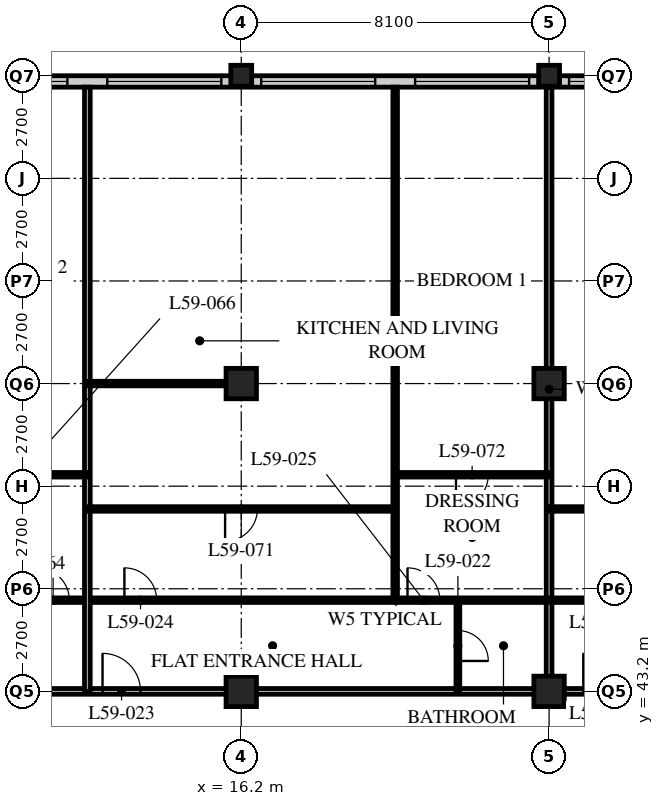
"""IFC4 building model, lengths in metres.
Left out: names, types, materials, properties, quantities, classifications, styles, units other than length and angle.
Written with IfcOpenShell. Run it as: python <this file> out.ifc"""

import sys

from ifc_helpers import new_model, si_unit, direction, frame, frame_2d, origin, origin_2d, place, context, subcontext, project, spatial, rectangle, hollow_rectangle, extrude, element, fill, save


model = new_model("IFC4")
c1 = context("Model", 3, precision=1e-05, world=origin(), true_north=direction((0.0, 1.0)))
c2 = subcontext(c1, "Body", "Model", "MODEL_VIEW")
j1 = project(units=[si_unit("LENGTHUNIT", "METRE"), si_unit("PLANEANGLEUNIT", "RADIAN")], contexts=[c1])
p1 = place(None, origin())
s1 = spatial("IfcSite", under=j1, at=p1, CompositionType="ELEMENT")
p2 = place(p1, origin())
s2 = spatial("IfcBuilding", under=s1, at=p2, CompositionType="ELEMENT")
p3 = place(p2, frame((0.0, 0.0, 228.0)))
s3 = spatial("IfcBuildingStorey", under=s2, at=p3, CompositionType="ELEMENT", Elevation=228.0)
for number, where, z_axis, x_axis in (
    (1, (16.2, 43.2, 0.0), (0.0, 0.0, 1.0), (1.0, 0.0, 0.0)),
    (2, (16.2, 51.3, 0.0), (0.0, 0.0, 1.0), (1.0, 0.0, 0.0)),
):
    element("IfcColumn", number, at=place(p3, frame(where, z_axis=z_axis, x_axis=x_axis)), inside=s3, PredefinedType="COLUMN", context=c2, shape_type="SweptSolid", body=[
        extrude(hollow_rectangle(XDim=0.8, YDim=0.8, WallThickness=0.08, at=origin_2d()), origin(), (0.0, 0.0, 1.0), 3.6),
    ])
p4 = place(p3, frame((16.2, 59.4, 0.0), z_axis=(0.0, 0.0, 1.0), x_axis=(1.0, 0.0, 0.0)))
e3 = element("IfcColumn", 3, at=p4, inside=s3, PredefinedType="COLUMN", context=c2, shape_type="SweptSolid", body=[
    extrude(hollow_rectangle(XDim=0.55, YDim=0.55, WallThickness=0.045, at=origin_2d()), origin(), (0.0, 0.0, 1.0), 3.6),
])
for number, where, z_axis, x_axis in (
    (4, (24.3, 43.2, 0.0), (0.0, 0.0, 1.0), (1.0, 0.0, 0.0)),
    (5, (24.3, 51.3, 0.0), (0.0, 0.0, 1.0), (1.0, 0.0, 0.0)),
):
    element("IfcColumn", number, at=place(p3, frame(where, z_axis=z_axis, x_axis=x_axis)), inside=s3, PredefinedType="COLUMN", context=c2, shape_type="SweptSolid", body=[
        extrude(hollow_rectangle(XDim=0.8, YDim=0.8, WallThickness=0.08, at=origin_2d()), origin(), (0.0, 0.0, 1.0), 3.6),
    ])
p5 = place(p3, frame((24.3, 59.4, 0.0), z_axis=(0.0, 0.0, 1.0), x_axis=(1.0, 0.0, 0.0)))
e6 = element("IfcColumn", 6, at=p5, inside=s3, PredefinedType="COLUMN", context=c2, shape_type="SweptSolid", body=[
    extrude(hollow_rectangle(XDim=0.55, YDim=0.55, WallThickness=0.045, at=origin_2d()), origin(), (0.0, 0.0, 1.0), 3.6),
])
p6 = place(p3, frame((48.3, 59.25, 0.0), z_axis=(0.0, 0.0, 1.0), x_axis=(-1.0, 0.0, 0.0)))
e7 = element("IfcWall", 7, at=p6, inside=s3, PredefinedType="SOLIDWALL", context=c2, shape_type="SweptSolid", body=[
    extrude(rectangle(XDim=40.2, YDim=0.3, at=frame_2d((20.1, 0.0))), origin(), (0.0, 0.0, 1.0), 3.39),
])
p7 = place(p6, frame((0.225, 0.0, 0.6)))
e8 = element("IfcOpeningElement", 8, at=p7, cuts=e7, PredefinedType="OPENING", context=c2, shape_type="SweptSolid", body=[
    extrude(rectangle(XDim=3.0, YDim=2.0, at=frame_2d((1.5, 1.0))), frame((0.0, 0.16, 0.0), z_axis=(0.0, -1.0, 0.0), x_axis=(1.0, 0.0, 0.0)), (0.0, 0.0, 1.0), 0.32),
])
p8 = place(p6, frame((4.275, 0.0, 0.6)))
e9 = element("IfcOpeningElement", 9, at=p8, cuts=e7, PredefinedType="OPENING", context=c2, shape_type="SweptSolid", body=[
    extrude(rectangle(XDim=3.0, YDim=2.0, at=frame_2d((1.5, 1.0))), frame((0.0, 0.16, 0.0), z_axis=(0.0, -1.0, 0.0), x_axis=(1.0, 0.0, 0.0)), (0.0, 0.0, 1.0), 0.32),
])
p9 = place(p6, frame((8.325, 0.0, 0.6)))
e10 = element("IfcOpeningElement", 10, at=p9, cuts=e7, PredefinedType="OPENING", context=c2, shape_type="SweptSolid", body=[
    extrude(rectangle(XDim=3.0, YDim=2.0, at=frame_2d((1.5, 1.0))), frame((0.0, 0.16, 0.0), z_axis=(0.0, -1.0, 0.0), x_axis=(1.0, 0.0, 0.0)), (0.0, 0.0, 1.0), 0.32),
])
p10 = place(p6, frame((12.375, 0.0, 0.6)))
e11 = element("IfcOpeningElement", 11, at=p10, cuts=e7, PredefinedType="OPENING", context=c2, shape_type="SweptSolid", body=[
    extrude(rectangle(XDim=3.0, YDim=2.0, at=frame_2d((1.5, 1.0))), frame((0.0, 0.16, 0.0), z_axis=(0.0, -1.0, 0.0), x_axis=(1.0, 0.0, 0.0)), (0.0, 0.0, 1.0), 0.32),
])
p11 = place(p6, frame((16.425, 0.0, 0.6)))
e12 = element("IfcOpeningElement", 12, at=p11, cuts=e7, PredefinedType="OPENING", context=c2, shape_type="SweptSolid", body=[
    extrude(rectangle(XDim=3.0, YDim=2.0, at=frame_2d((1.5, 1.0))), frame((0.0, 0.16, 0.0), z_axis=(0.0, -1.0, 0.0), x_axis=(1.0, 0.0, 0.0)), (0.0, 0.0, 1.0), 0.32),
])
p12 = place(p6, frame((20.475, 0.0, 0.6)))
e13 = element("IfcOpeningElement", 13, at=p12, cuts=e7, PredefinedType="OPENING", context=c2, shape_type="SweptSolid", body=[
    extrude(rectangle(XDim=3.0, YDim=2.0, at=frame_2d((1.5, 1.0))), frame((0.0, 0.16, 0.0), z_axis=(0.0, -1.0, 0.0), x_axis=(1.0, 0.0, 0.0)), (0.0, 0.0, 1.0), 0.32),
])
p13 = place(p6, frame((24.525, 0.0, 0.6)))
e14 = element("IfcOpeningElement", 14, at=p13, cuts=e7, PredefinedType="OPENING", context=c2, shape_type="SweptSolid", body=[
    extrude(rectangle(XDim=3.0, YDim=2.0, at=frame_2d((1.5, 1.0))), frame((0.0, 0.16, 0.0), z_axis=(0.0, -1.0, 0.0), x_axis=(1.0, 0.0, 0.0)), (0.0, 0.0, 1.0), 0.32),
])
p14 = place(p6, frame((28.575, 0.0, 0.6)))
e15 = element("IfcOpeningElement", 15, at=p14, cuts=e7, PredefinedType="OPENING", context=c2, shape_type="SweptSolid", body=[
    extrude(rectangle(XDim=3.0, YDim=2.0, at=frame_2d((1.5, 1.0))), frame((0.0, 0.16, 0.0), z_axis=(0.0, -1.0, 0.0), x_axis=(1.0, 0.0, 0.0)), (0.0, 0.0, 1.0), 0.32),
])
p15 = place(p6, frame((32.625, 0.0, 0.6)))
e16 = element("IfcOpeningElement", 16, at=p15, cuts=e7, PredefinedType="OPENING", context=c2, shape_type="SweptSolid", body=[
    extrude(rectangle(XDim=3.0, YDim=2.0, at=frame_2d((1.5, 1.0))), frame((0.0, 0.16, 0.0), z_axis=(0.0, -1.0, 0.0), x_axis=(1.0, 0.0, 0.0)), (0.0, 0.0, 1.0), 0.32),
])
p16 = place(p6, frame((36.675, 0.0, 0.6)))
e17 = element("IfcOpeningElement", 17, at=p16, cuts=e7, PredefinedType="OPENING", context=c2, shape_type="SweptSolid", body=[
    extrude(rectangle(XDim=3.0, YDim=2.0, at=frame_2d((1.5, 1.0))), frame((0.0, 0.16, 0.0), z_axis=(0.0, -1.0, 0.0), x_axis=(1.0, 0.0, 0.0)), (0.0, 0.0, 1.0), 0.32),
])
p17 = place(p3, frame((8.1, 43.2, 0.0), z_axis=(0.0, 0.0, 1.0), x_axis=(1.0, 0.0, 0.0)))
e18 = element("IfcWall", 18, at=p17, inside=s3, PredefinedType="PARTITIONING", context=c2, shape_type="SweptSolid", body=[
    extrude(rectangle(XDim=36.45, YDim=0.15, at=frame_2d((18.225, 0.0))), origin(), (0.0, 0.0, 1.0), 2.628),
])
p18 = place(p17, frame((4.45, 0.0, 0.0)))
e19 = element("IfcOpeningElement", 19, at=p18, cuts=e18, PredefinedType="OPENING", context=c2, shape_type="SweptSolid", body=[
    extrude(rectangle(XDim=1.0, YDim=2.1, at=frame_2d((0.5, 1.05))), frame((0.0, 0.085, 0.0), z_axis=(0.0, -1.0, 0.0), x_axis=(1.0, 0.0, 0.0)), (0.0, 0.0, 1.0), 0.17),
])
p19 = place(p17, frame((17.1, 0.0, 0.0)))
e20 = element("IfcOpeningElement", 20, at=p19, cuts=e18, PredefinedType="OPENING", context=c2, shape_type="SweptSolid", body=[
    extrude(rectangle(XDim=1.0, YDim=2.1, at=frame_2d((0.5, 1.05))), frame((0.0, 0.085, 0.0), z_axis=(0.0, -1.0, 0.0), x_axis=(1.0, 0.0, 0.0)), (0.0, 0.0, 1.0), 0.17),
])
p20 = place(p17, frame((29.05, 0.0, 0.0)))
e21 = element("IfcOpeningElement", 21, at=p20, cuts=e18, PredefinedType="OPENING", context=c2, shape_type="SweptSolid", body=[
    extrude(rectangle(XDim=1.0, YDim=2.1, at=frame_2d((0.5, 1.05))), frame((0.0, 0.085, 0.0), z_axis=(0.0, -1.0, 0.0), x_axis=(1.0, 0.0, 0.0)), (0.0, 0.0, 1.0), 0.17),
])
p21 = place(p17, frame((33.925, 0.0, 0.0)))
e22 = element("IfcOpeningElement", 22, at=p21, cuts=e18, PredefinedType="OPENING", context=c2, shape_type="SweptSolid", body=[
    extrude(rectangle(XDim=1.0, YDim=2.1, at=frame_2d((0.5, 1.05))), frame((0.0, 0.085, 0.0), z_axis=(0.0, -1.0, 0.0), x_axis=(1.0, 0.0, 0.0)), (0.0, 0.0, 1.0), 0.17),
])
p22 = place(p17, frame((1.525, 0.0, 0.0)))
e23 = element("IfcOpeningElement", 23, at=p22, cuts=e18, PredefinedType="OPENING", context=c2, shape_type="SweptSolid", body=[
    extrude(rectangle(XDim=1.0, YDim=2.1, at=frame_2d((0.5, 1.05))), frame((0.0, 0.085, 0.0), z_axis=(0.0, -1.0, 0.0), x_axis=(1.0, 0.0, 0.0)), (0.0, 0.0, 1.0), 0.17),
])
p23 = place(p3, frame((21.9, 43.2, 0.0), z_axis=(0.0, 0.0, 1.0), x_axis=(0.0, 1.0, 0.0)))
e24 = element("IfcWall", 24, at=p23, inside=s3, PredefinedType="PARTITIONING", context=c2, shape_type="SweptSolid", body=[
    extrude(rectangle(XDim=2.4, YDim=0.1, at=frame_2d((1.2, 0.0))), origin(), (0.0, 0.0, 1.0), 3.39),
])
p24 = place(p23, frame((0.8, 0.0, 0.0)))
e25 = element("IfcOpeningElement", 25, at=p24, cuts=e24, PredefinedType="OPENING", context=c2, shape_type="SweptSolid", body=[
    extrude(rectangle(XDim=0.8, YDim=2.1, at=frame_2d((0.4, 1.05))), frame((0.0, 0.06, 0.0), z_axis=(0.0, -1.0, 0.0), x_axis=(1.0, 0.0, 0.0)), (0.0, 0.0, 1.0), 0.12),
])
p25 = place(p3, frame((20.25, 45.6, 0.0), z_axis=(0.0, 0.0, 1.0), x_axis=(0.0, 1.0, 0.0)))
e26 = element("IfcWall", 26, at=p25, inside=s3, PredefinedType="PARTITIONING", context=c2, shape_type="SweptSolid", body=[
    extrude(rectangle(XDim=13.5, YDim=0.12, at=frame_2d((6.75, 0.0))), origin(), (0.0, 0.0, 1.0), 3.39),
])
p26 = place(p3, frame((24.3, 43.2, 0.0), z_axis=(0.0, 0.0, 1.0), x_axis=(0.0, 1.0, 0.0)))
e27 = element("IfcWall", 27, at=p26, inside=s3, PredefinedType="PARTITIONING", context=c2, shape_type="SweptSolid", body=[
    extrude(rectangle(XDim=15.9, YDim=0.15, at=frame_2d((7.95, 0.0))), origin(), (0.0, 0.0, 1.0), 2.628),
])
p27 = place(p3, frame((4.1, 45.6, 0.0), z_axis=(0.0, 0.0, 1.0), x_axis=(1.0, 0.0, 0.0)))
e28 = element("IfcWall", 28, at=p27, inside=s3, PredefinedType="PARTITIONING", context=c2, shape_type="SweptSolid", body=[
    extrude(rectangle(XDim=32.35, YDim=0.12, at=frame_2d((16.175, 0.0))), origin(), (0.0, 0.0, 1.0), 3.39),
])
p28 = place(p27, frame((9.025, 0.0, 0.0)))
e29 = element("IfcOpeningElement", 29, at=p28, cuts=e28, PredefinedType="OPENING", context=c2, shape_type="SweptSolid", body=[
    extrude(rectangle(XDim=0.85, YDim=2.1, at=frame_2d((0.425, 1.05))), frame((0.0, 0.07, 0.0), z_axis=(0.0, -1.0, 0.0), x_axis=(1.0, 0.0, 0.0)), (0.0, 0.0, 1.0), 0.14),
])
p29 = place(p27, frame((16.475, 0.0, 0.0)))
e30 = element("IfcOpeningElement", 30, at=p29, cuts=e28, PredefinedType="OPENING", context=c2, shape_type="SweptSolid", body=[
    extrude(rectangle(XDim=0.85, YDim=2.1, at=frame_2d((0.425, 1.05))), frame((0.0, 0.07, 0.0), z_axis=(0.0, -1.0, 0.0), x_axis=(1.0, 0.0, 0.0)), (0.0, 0.0, 1.0), 0.14),
])
p30 = place(p27, frame((21.175, 0.0, 0.0)))
e31 = element("IfcOpeningElement", 31, at=p30, cuts=e28, PredefinedType="OPENING", context=c2, shape_type="SweptSolid", body=[
    extrude(rectangle(XDim=0.85, YDim=2.1, at=frame_2d((0.425, 1.05))), frame((0.0, 0.07, 0.0), z_axis=(0.0, -1.0, 0.0), x_axis=(1.0, 0.0, 0.0)), (0.0, 0.0, 1.0), 0.14),
])
p31 = place(p27, frame((28.625, 0.0, 0.0)))
e32 = element("IfcOpeningElement", 32, at=p31, cuts=e28, PredefinedType="OPENING", context=c2, shape_type="SweptSolid", body=[
    extrude(rectangle(XDim=0.85, YDim=2.1, at=frame_2d((0.425, 1.05))), frame((0.0, 0.07, 0.0), z_axis=(0.0, -1.0, 0.0), x_axis=(1.0, 0.0, 0.0)), (0.0, 0.0, 1.0), 0.14),
])
p32 = place(p27, frame((6.725, 0.0, 0.0)))
e33 = element("IfcOpeningElement", 33, at=p32, cuts=e28, PredefinedType="OPENING", context=c2, shape_type="SweptSolid", body=[
    extrude(rectangle(XDim=0.85, YDim=2.1, at=frame_2d((0.425, 1.05))), frame((0.0, 0.07, 0.0), z_axis=(0.0, -1.0, 0.0), x_axis=(1.0, 0.0, 0.0)), (0.0, 0.0, 1.0), 0.14),
])
p33 = place(p27, frame((2.875, 0.0, 0.0)))
e34 = element("IfcOpeningElement", 34, at=p33, cuts=e28, PredefinedType="OPENING", context=c2, shape_type="SweptSolid", body=[
    extrude(rectangle(XDim=0.85, YDim=2.1, at=frame_2d((0.425, 1.05))), frame((0.0, 0.07, 0.0), z_axis=(0.0, -1.0, 0.0), x_axis=(1.0, 0.0, 0.0)), (0.0, 0.0, 1.0), 0.14),
])
p34 = place(p3, frame((12.15, 43.2, 0.0), z_axis=(0.0, 0.0, 1.0), x_axis=(0.0, 1.0, 0.0)))
e35 = element("IfcWall", 35, at=p34, inside=s3, PredefinedType="PARTITIONING", context=c2, shape_type="SweptSolid", body=[
    extrude(rectangle(XDim=15.9, YDim=0.15, at=frame_2d((7.95, 0.0))), origin(), (0.0, 0.0, 1.0), 3.39),
])
p35 = place(p3, frame((12.15, 48.0, 0.0), z_axis=(0.0, 0.0, 1.0), x_axis=(1.0, 0.0, 0.0)))
e36 = element("IfcWall", 36, at=p35, inside=s3, PredefinedType="PARTITIONING", context=c2, shape_type="SweptSolid", body=[
    extrude(rectangle(XDim=8.1, YDim=0.12, at=frame_2d((4.05, 0.0))), origin(), (0.0, 0.0, 1.0), 3.39),
])
p36 = place(p35, frame((3.625, 0.0, 0.0)))
e37 = element("IfcOpeningElement", 37, at=p36, cuts=e36, PredefinedType="OPENING", context=c2, shape_type="SweptSolid", body=[
    extrude(rectangle(XDim=0.85, YDim=2.1, at=frame_2d((0.425, 1.05))), frame((0.0, 0.07, 0.0), z_axis=(0.0, -1.0, 0.0), x_axis=(1.0, 0.0, 0.0)), (0.0, 0.0, 1.0), 0.14),
])
p37 = place(p3, frame((20.25, 48.9, 0.0), z_axis=(0.0, 0.0, 1.0), x_axis=(1.0, 0.0, 0.0)))
e38 = element("IfcWall", 38, at=p37, inside=s3, PredefinedType="PARTITIONING", context=c2, shape_type="SweptSolid", body=[
    extrude(rectangle(XDim=4.05, YDim=0.12, at=frame_2d((2.025, 0.0))), origin(), (0.0, 0.0, 1.0), 3.39),
])
p38 = place(p37, frame((1.6, 0.0, 0.0)))
e39 = element("IfcOpeningElement", 39, at=p38, cuts=e38, PredefinedType="OPENING", context=c2, shape_type="SweptSolid", body=[
    extrude(rectangle(XDim=0.85, YDim=2.1, at=frame_2d((0.425, 1.05))), frame((0.0, 0.07, 0.0), z_axis=(0.0, -1.0, 0.0), x_axis=(1.0, 0.0, 0.0)), (0.0, 0.0, 1.0), 0.14),
])
p39 = place(p3, frame((24.3, 48.0, 0.0), z_axis=(0.0, 0.0, 1.0), x_axis=(1.0, 0.0, 0.0)))
e40 = element("IfcWall", 40, at=p39, inside=s3, PredefinedType="PARTITIONING", context=c2, shape_type="SweptSolid", body=[
    extrude(rectangle(XDim=8.1, YDim=0.12, at=frame_2d((4.05, 0.0))), origin(), (0.0, 0.0, 1.0), 3.39),
])
p40 = place(p39, frame((3.625, 0.0, 0.0)))
e41 = element("IfcOpeningElement", 41, at=p40, cuts=e40, PredefinedType="OPENING", context=c2, shape_type="SweptSolid", body=[
    extrude(rectangle(XDim=0.85, YDim=2.1, at=frame_2d((0.425, 1.05))), frame((0.0, 0.07, 0.0), z_axis=(0.0, -1.0, 0.0), x_axis=(1.0, 0.0, 0.0)), (0.0, 0.0, 1.0), 0.14),
])
p41 = place(p3, frame((8.1, 48.9, 0.0), z_axis=(0.0, 0.0, 1.0), x_axis=(1.0, 0.0, 0.0)))
e42 = element("IfcWall", 42, at=p41, inside=s3, PredefinedType="PARTITIONING", context=c2, shape_type="SweptSolid", body=[
    extrude(rectangle(XDim=4.05, YDim=0.12, at=frame_2d((2.025, 0.0))), origin(), (0.0, 0.0, 1.0), 3.39),
])
p42 = place(p41, frame((1.6, 0.0, 0.0)))
e43 = element("IfcOpeningElement", 43, at=p42, cuts=e42, PredefinedType="OPENING", context=c2, shape_type="SweptSolid", body=[
    extrude(rectangle(XDim=0.85, YDim=2.1, at=frame_2d((0.425, 1.05))), frame((0.0, 0.07, 0.0), z_axis=(0.0, -1.0, 0.0), x_axis=(1.0, 0.0, 0.0)), (0.0, 0.0, 1.0), 0.14),
])
p43 = place(p3, frame((12.15, 51.3, 0.0), z_axis=(0.0, 0.0, 1.0), x_axis=(1.0, 0.0, 0.0)))
e44 = element("IfcWall", 44, at=p43, inside=s3, PredefinedType="PARTITIONING", context=c2, shape_type="SweptSolid", body=[
    extrude(rectangle(XDim=3.65, YDim=0.12, at=frame_2d((1.825, 0.0))), origin(), (0.0, 0.0, 1.0), 2.628),
])
p44 = place(p12, origin())
e45 = element("IfcWindow", 45, at=p44, inside=s3, PartitioningType="SINGLE_PANEL", PredefinedType="WINDOW", context=c2, shape_type="SweptSolid", body=[
    extrude(rectangle(XDim=3.0, YDim=2.0, at=frame_2d((1.5, 1.0))), frame((0.0, 0.03, 0.0), z_axis=(0.0, -1.0, 0.0), x_axis=(1.0, 0.0, 0.0)), (0.0, 0.0, 1.0), 0.06),
])
fill(e13, e45)
p45 = place(p13, origin())
e46 = element("IfcWindow", 46, at=p45, inside=s3, PartitioningType="SINGLE_PANEL", PredefinedType="WINDOW", context=c2, shape_type="SweptSolid", body=[
    extrude(rectangle(XDim=3.0, YDim=2.0, at=frame_2d((1.5, 1.0))), frame((0.0, 0.03, 0.0), z_axis=(0.0, -1.0, 0.0), x_axis=(1.0, 0.0, 0.0)), (0.0, 0.0, 1.0), 0.06),
])
fill(e14, e46)
p46 = place(p14, origin())
e47 = element("IfcWindow", 47, at=p46, inside=s3, PartitioningType="SINGLE_PANEL", PredefinedType="WINDOW", context=c2, shape_type="SweptSolid", body=[
    extrude(rectangle(XDim=3.0, YDim=2.0, at=frame_2d((1.5, 1.0))), frame((0.0, 0.03, 0.0), z_axis=(0.0, -1.0, 0.0), x_axis=(1.0, 0.0, 0.0)), (0.0, 0.0, 1.0), 0.06),
])
fill(e15, e47)
p47 = place(p15, origin())
e48 = element("IfcWindow", 48, at=p47, inside=s3, PartitioningType="SINGLE_PANEL", PredefinedType="WINDOW", context=c2, shape_type="SweptSolid", body=[
    extrude(rectangle(XDim=3.0, YDim=2.0, at=frame_2d((1.5, 1.0))), frame((0.0, 0.03, 0.0), z_axis=(0.0, -1.0, 0.0), x_axis=(1.0, 0.0, 0.0)), (0.0, 0.0, 1.0), 0.06),
])
fill(e16, e48)
p48 = place(p16, origin())
e49 = element("IfcWindow", 49, at=p48, inside=s3, PartitioningType="SINGLE_PANEL", PredefinedType="WINDOW", context=c2, shape_type="SweptSolid", body=[
    extrude(rectangle(XDim=3.0, YDim=2.0, at=frame_2d((1.5, 1.0))), frame((0.0, 0.03, 0.0), z_axis=(0.0, -1.0, 0.0), x_axis=(1.0, 0.0, 0.0)), (0.0, 0.0, 1.0), 0.06),
])
fill(e17, e49)
p49 = place(p24, origin())
e50 = element("IfcDoor", 50, at=p49, inside=s3, OperationType="SINGLE_SWING_RIGHT", PredefinedType="DOOR", context=c2, shape_type="SweptSolid", body=[
    extrude(rectangle(XDim=0.8, YDim=2.1, at=frame_2d((0.4, 1.05))), frame((0.0, 0.025, 0.0), z_axis=(0.0, -1.0, 0.0), x_axis=(1.0, 0.0, 0.0)), (0.0, 0.0, 1.0), 0.05),
])
fill(e25, e50)
p50 = place(p18, origin())
e51 = element("IfcDoor", 51, at=p50, inside=s3, OperationType="SINGLE_SWING_LEFT", PredefinedType="DOOR", context=c2, shape_type="SweptSolid", body=[
    extrude(rectangle(XDim=1.0, YDim=2.1, at=frame_2d((0.5, 1.05))), frame((0.0, 0.025, 0.0), z_axis=(0.0, -1.0, 0.0), x_axis=(1.0, 0.0, 0.0)), (0.0, 0.0, 1.0), 0.05),
])
fill(e19, e51)
p51 = place(p28, origin())
e52 = element("IfcDoor", 52, at=p51, inside=s3, OperationType="SINGLE_SWING_LEFT", PredefinedType="DOOR", context=c2, shape_type="SweptSolid", body=[
    extrude(rectangle(XDim=0.85, YDim=2.1, at=frame_2d((0.425, 1.05))), frame((0.0, 0.025, 0.0), z_axis=(0.0, -1.0, 0.0), x_axis=(1.0, 0.0, 0.0)), (0.0, 0.0, 1.0), 0.05),
])
fill(e29, e52)
p52 = place(p29, origin())
e53 = element("IfcDoor", 53, at=p52, inside=s3, OperationType="SINGLE_SWING_LEFT", PredefinedType="DOOR", context=c2, shape_type="SweptSolid", body=[
    extrude(rectangle(XDim=0.85, YDim=2.1, at=frame_2d((0.425, 1.05))), frame((0.0, 0.025, 0.0), z_axis=(0.0, -1.0, 0.0), x_axis=(1.0, 0.0, 0.0)), (0.0, 0.0, 1.0), 0.05),
])
fill(e30, e53)
p53 = place(p19, origin())
e54 = element("IfcDoor", 54, at=p53, inside=s3, OperationType="SINGLE_SWING_LEFT", PredefinedType="DOOR", context=c2, shape_type="SweptSolid", body=[
    extrude(rectangle(XDim=1.0, YDim=2.1, at=frame_2d((0.5, 1.05))), frame((0.0, 0.025, 0.0), z_axis=(0.0, -1.0, 0.0), x_axis=(1.0, 0.0, 0.0)), (0.0, 0.0, 1.0), 0.05),
])
fill(e20, e54)
p54 = place(p32, origin())
e55 = element("IfcDoor", 55, at=p54, inside=s3, OperationType="SINGLE_SWING_LEFT", PredefinedType="DOOR", context=c2, shape_type="SweptSolid", body=[
    extrude(rectangle(XDim=0.85, YDim=2.1, at=frame_2d((0.425, 1.05))), frame((0.0, 0.025, 0.0), z_axis=(0.0, -1.0, 0.0), x_axis=(1.0, 0.0, 0.0)), (0.0, 0.0, 1.0), 0.05),
])
fill(e33, e55)
p55 = place(p36, origin())
e56 = element("IfcDoor", 56, at=p55, inside=s3, OperationType="SINGLE_SWING_RIGHT", PredefinedType="DOOR", context=c2, shape_type="SweptSolid", body=[
    extrude(rectangle(XDim=0.85, YDim=2.1, at=frame_2d((0.425, 1.05))), frame((0.0, 0.025, 0.0), z_axis=(0.0, -1.0, 0.0), x_axis=(1.0, 0.0, 0.0)), (0.0, 0.0, 1.0), 0.05),
])
fill(e37, e56)
p56 = place(p38, origin())
e57 = element("IfcDoor", 57, at=p56, inside=s3, OperationType="SINGLE_SWING_RIGHT", PredefinedType="DOOR", context=c2, shape_type="SweptSolid", body=[
    extrude(rectangle(XDim=0.85, YDim=2.1, at=frame_2d((0.425, 1.05))), frame((0.0, 0.025, 0.0), z_axis=(0.0, -1.0, 0.0), x_axis=(1.0, 0.0, 0.0)), (0.0, 0.0, 1.0), 0.05),
])
fill(e39, e57)
save(model, sys.argv[1])
